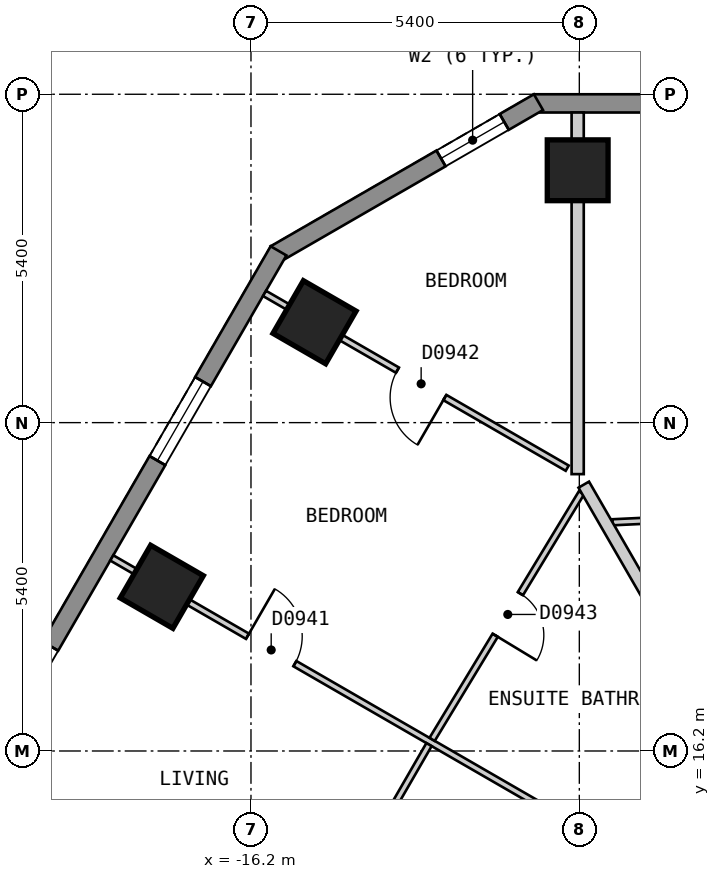
"""IFC4 building model, lengths in metres.
Left out: names, types, materials, properties, quantities, classifications, styles, units other than length and angle.
Written with IfcOpenShell. Run it as: python <this file> out.ifc"""

import sys

from ifc_helpers import new_model, si_unit, direction, frame, frame_2d, origin, origin_2d, place, context, subcontext, project, spatial, polyline, rectangle, outline, extrude, element, fill, save


model = new_model("IFC4")
c1 = context("Model", 3, precision=1e-05, world=origin(), true_north=direction((0.0, 1.0)))
c2 = subcontext(c1, "Body", "Model", "MODEL_VIEW")
j1 = project(units=[si_unit("LENGTHUNIT", "METRE"), si_unit("PLANEANGLEUNIT", "RADIAN")], contexts=[c1])
p1 = place(None, origin())
s1 = spatial("IfcSite", under=j1, at=p1, CompositionType="ELEMENT")
p2 = place(p1, origin())
s2 = spatial("IfcBuilding", under=s1, at=p2, CompositionType="ELEMENT")
p3 = place(p2, frame((0.0, 0.0, 102.0)))
s3 = spatial("IfcBuildingStorey", under=s2, at=p3, CompositionType="ELEMENT", Elevation=102.0)
for number, where, z_axis, x_axis in (
    (1, (-10.827, 25.75, 0.0), (0.0, 0.0, 1.0), (-1.0, 0.0, 0.0)),
    (2, (-15.155, 23.251, 0.0), (0.0, 0.0, 1.0), (-0.5, -0.866, 0.0)),
    (3, (-17.667, 18.9, 0.0), (0.0, 0.0, 1.0), (-0.5, -0.866, 0.0)),
):
    element("IfcColumn", number, at=place(p3, frame(where, z_axis=z_axis, x_axis=x_axis)), inside=s3, PredefinedType="COLUMN", context=c2, shape_type="SweptSolid", body=[
        extrude(rectangle(XDim=1.0, YDim=1.0, at=origin_2d()), origin(), (0.0, 0.0, 1.0), 3.0),
    ])
p4 = place(p3, frame((11.547, 26.85, 0.0), z_axis=(0.0, 0.0, 1.0), x_axis=(-1.0, 0.0, 0.0)))
e4 = element("IfcWall", 4, at=p4, inside=s3, PredefinedType="SOLIDWALL", context=c2, shape_type="SweptSolid", body=[
    extrude(outline(polyline([(0.0, -0.15), (23.094, -0.15), (23.014, 0.15), (0.08, 0.15), (0.0, -0.15)])), origin(), (0.0, 0.0, 1.0), 2.7),
])
p5 = place(p4, frame((2.678, 0.0, 0.15)))
e5 = element("IfcOpeningElement", 5, at=p5, cuts=e4, PredefinedType="OPENING", context=c2, shape_type="SweptSolid", body=[
    extrude(rectangle(XDim=1.5, YDim=2.1, at=frame_2d((0.75, 1.05))), frame((0.0, 0.16, 0.0), z_axis=(0.0, -1.0, 0.0), x_axis=(1.0, 0.0, 0.0)), (0.0, 0.0, 1.0), 0.32),
])
p6 = place(p4, frame((8.092, 0.0, 0.15)))
e6 = element("IfcOpeningElement", 6, at=p6, cuts=e4, PredefinedType="OPENING", context=c2, shape_type="SweptSolid", body=[
    extrude(rectangle(XDim=1.5, YDim=2.1, at=frame_2d((0.75, 1.05))), frame((0.0, 0.16, 0.0), z_axis=(0.0, -1.0, 0.0), x_axis=(1.0, 0.0, 0.0)), (0.0, 0.0, 1.0), 0.32),
])
p7 = place(p4, frame((13.504, 0.0, 0.15)))
e7 = element("IfcOpeningElement", 7, at=p7, cuts=e4, PredefinedType="OPENING", context=c2, shape_type="SweptSolid", body=[
    extrude(rectangle(XDim=1.5, YDim=2.1, at=frame_2d((0.75, 1.05))), frame((0.0, 0.16, 0.0), z_axis=(0.0, -1.0, 0.0), x_axis=(1.0, 0.0, 0.0)), (0.0, 0.0, 1.0), 0.32),
])
p8 = place(p4, frame((18.917, 0.0, 0.15)))
e8 = element("IfcOpeningElement", 8, at=p8, cuts=e4, PredefinedType="OPENING", context=c2, shape_type="SweptSolid", body=[
    extrude(rectangle(XDim=1.5, YDim=2.1, at=frame_2d((0.75, 1.05))), frame((0.0, 0.16, 0.0), z_axis=(0.0, -1.0, 0.0), x_axis=(1.0, 0.0, 0.0)), (0.0, 0.0, 1.0), 0.32),
])
p9 = place(p3, frame((-11.472, 26.87, 0.0), z_axis=(0.0, 0.0, 1.0), x_axis=(-0.866022959057, -0.500004234368, 0.0)))
e9 = element("IfcWall", 9, at=p9, inside=s3, PredefinedType="SOLIDWALL", context=c2, shape_type="SweptSolid", body=[
    extrude(outline(polyline([(0.0, -0.15), (5.0, -0.15), (4.92, 0.15), (0.08, 0.15), (0.0, -0.15)])), origin(), (0.0, 0.0, 1.0), 2.7),
])
p10 = place(p9, frame((0.65, 0.0, 0.15)))
e10 = element("IfcOpeningElement", 10, at=p10, cuts=e9, PredefinedType="OPENING", context=c2, shape_type="SweptSolid", body=[
    extrude(rectangle(XDim=1.2, YDim=2.1, at=frame_2d((0.6, 1.05))), frame((0.0, 0.16, 0.0), z_axis=(0.0, -1.0, 0.0), x_axis=(1.0, 0.0, 0.0)), (0.0, 0.0, 1.0), 0.32),
])
p11 = place(p3, frame((-15.747, 24.425, 0.0), z_axis=(0.0, 0.0, 1.0), x_axis=(-0.500027479704, -0.866009537788, 0.0)))
e11 = element("IfcWall", 11, at=p11, inside=s3, PredefinedType="SOLIDWALL", context=c2, shape_type="SweptSolid", body=[
    extrude(outline(polyline([(0.0, -0.15), (26.559, -0.15), (26.478, 0.15), (0.08, 0.15), (0.0, -0.15)])), origin(), (0.0, 0.0, 1.0), 2.7),
])
p12 = place(p11, frame((2.483, 0.0, 0.15)))
e12 = element("IfcOpeningElement", 12, at=p12, cuts=e11, PredefinedType="OPENING", context=c2, shape_type="SweptSolid", body=[
    extrude(rectangle(XDim=1.5, YDim=2.1, at=frame_2d((0.75, 1.05))), frame((0.0, 0.16, 0.0), z_axis=(0.0, -1.0, 0.0), x_axis=(1.0, 0.0, 0.0)), (0.0, 0.0, 1.0), 0.32),
])
p13 = place(p11, frame((7.506, 0.0, 0.15)))
e13 = element("IfcOpeningElement", 13, at=p13, cuts=e11, PredefinedType="OPENING", context=c2, shape_type="SweptSolid", body=[
    extrude(rectangle(XDim=1.5, YDim=2.1, at=frame_2d((0.75, 1.05))), frame((0.0, 0.16, 0.0), z_axis=(0.0, -1.0, 0.0), x_axis=(1.0, 0.0, 0.0)), (0.0, 0.0, 1.0), 0.32),
])
p14 = place(p11, frame((12.529, 0.0, 0.15)))
e14 = element("IfcOpeningElement", 14, at=p14, cuts=e11, PredefinedType="OPENING", context=c2, shape_type="SweptSolid", body=[
    extrude(rectangle(XDim=1.5, YDim=2.1, at=frame_2d((0.75, 1.05))), frame((0.0, 0.16, 0.0), z_axis=(0.0, -1.0, 0.0), x_axis=(1.0, 0.0, 0.0)), (0.0, 0.0, 1.0), 0.32),
])
p15 = place(p11, frame((17.552, 0.0, 0.15)))
e15 = element("IfcOpeningElement", 15, at=p15, cuts=e11, PredefinedType="OPENING", context=c2, shape_type="SweptSolid", body=[
    extrude(rectangle(XDim=1.5, YDim=2.1, at=frame_2d((0.75, 1.05))), frame((0.0, 0.16, 0.0), z_axis=(0.0, -1.0, 0.0), x_axis=(1.0, 0.0, 0.0)), (0.0, 0.0, 1.0), 0.32),
])
p16 = place(p11, frame((22.575, 0.0, 0.15)))
e16 = element("IfcOpeningElement", 16, at=p16, cuts=e11, PredefinedType="OPENING", context=c2, shape_type="SweptSolid", body=[
    extrude(rectangle(XDim=1.5, YDim=2.1, at=frame_2d((0.75, 1.05))), frame((0.0, 0.16, 0.0), z_axis=(0.0, -1.0, 0.0), x_axis=(1.0, 0.0, 0.0)), (0.0, 0.0, 1.0), 0.32),
])
p17 = place(p3, frame((-18.562, -0.951, 0.0), z_axis=(0.0, 0.0, 1.0), x_axis=(0.499987097491, 0.866032852923, 0.0)))
e17 = element("IfcWall", 17, at=p17, inside=s3, PredefinedType="PARTITIONING", context=c2, shape_type="SweptSolid", body=[
    extrude(rectangle(XDim=20.15, YDim=0.2, at=frame_2d((10.075, 0.0))), origin(), (0.0, 0.0, 1.0), 2.7),
])
p18 = place(p17, frame((14.627, 0.0, 0.0)))
e18 = element("IfcOpeningElement", 18, at=p18, cuts=e17, PredefinedType="OPENING", context=c2, shape_type="SweptSolid", body=[
    extrude(rectangle(XDim=1.0, YDim=2.1, at=frame_2d((0.5, 1.05))), frame((0.0, 0.11, 0.0), z_axis=(0.0, -1.0, 0.0), x_axis=(1.0, 0.0, 0.0)), (0.0, 0.0, 1.0), 0.22),
])
p19 = place(p17, frame((9.604, 0.0, 0.0)))
e19 = element("IfcOpeningElement", 19, at=p19, cuts=e17, PredefinedType="OPENING", context=c2, shape_type="SweptSolid", body=[
    extrude(rectangle(XDim=1.0, YDim=2.1, at=frame_2d((0.5, 1.05))), frame((0.0, 0.11, 0.0), z_axis=(0.0, -1.0, 0.0), x_axis=(1.0, 0.0, 0.0)), (0.0, 0.0, 1.0), 0.22),
])
p20 = place(p3, frame((-18.489, 19.375, 0.0), z_axis=(0.0, 0.0, 1.0), x_axis=(0.866016855193, -0.500014806302, 0.0)))
e20 = element("IfcWall", 20, at=p20, inside=s3, PredefinedType="PARTITIONING", context=c2, shape_type="SweptSolid", body=[
    extrude(rectangle(XDim=10.0, YDim=0.1, at=frame_2d((5.0, 0.0))), origin(), (0.0, 0.0, 1.0), 2.7),
])
p21 = place(p20, frame((2.577, 0.0, 0.0)))
e21 = element("IfcOpeningElement", 21, at=p21, cuts=e20, PredefinedType="OPENING", context=c2, shape_type="SweptSolid", body=[
    extrude(rectangle(XDim=0.9, YDim=2.1, at=frame_2d((0.45, 1.05))), frame((0.0, 0.06, 0.0), z_axis=(0.0, -1.0, 0.0), x_axis=(1.0, 0.0, 0.0)), (0.0, 0.0, 1.0), 0.12),
])
p22 = place(p3, frame((-15.977, 23.725, 0.0), z_axis=(0.0, 0.0, 1.0), x_axis=(0.866028566888, -0.499994521305, 0.0)))
e22 = element("IfcWall", 22, at=p22, inside=s3, PredefinedType="PARTITIONING", context=c2, shape_type="SweptSolid", body=[
    extrude(rectangle(XDim=5.748, YDim=0.1, at=frame_2d((2.874, 0.0))), origin(), (0.0, 0.0, 1.0), 2.7),
])
p23 = place(p22, frame((2.524, 0.0, 0.0)))
e23 = element("IfcOpeningElement", 23, at=p23, cuts=e22, PredefinedType="OPENING", context=c2, shape_type="SweptSolid", body=[
    extrude(rectangle(XDim=0.9, YDim=2.1, at=frame_2d((0.45, 1.05))), frame((0.0, 0.06, 0.0), z_axis=(0.0, -1.0, 0.0), x_axis=(1.0, 0.0, 0.0)), (0.0, 0.0, 1.0), 0.12),
])
p24 = place(p3, frame((-13.221, 16.391, 0.0), z_axis=(0.0, 0.0, 1.0), x_axis=(0.518164725284, 0.855280841286, 0.0)))
e24 = element("IfcWall", 24, at=p24, inside=s3, PredefinedType="PARTITIONING", context=c2, shape_type="SweptSolid", body=[
    extrude(rectangle(XDim=4.74, YDim=0.1, at=frame_2d((2.37, 0.0))), origin(), (0.0, 0.0, 1.0), 2.7),
])
p25 = place(p24, frame((2.002, 0.0, 0.0)))
e25 = element("IfcOpeningElement", 25, at=p25, cuts=e24, PredefinedType="OPENING", context=c2, shape_type="SweptSolid", body=[
    extrude(rectangle(XDim=0.8, YDim=2.1, at=frame_2d((0.4, 1.05))), frame((0.0, 0.06, 0.0), z_axis=(0.0, -1.0, 0.0), x_axis=(1.0, 0.0, 0.0)), (0.0, 0.0, 1.0), 0.12),
])
p26 = place(p3, frame((-15.708, 12.085, 0.0), z_axis=(0.0, 0.0, 1.0), x_axis=(0.499943653708, 0.866057932887, 0.0)))
e26 = element("IfcWall", 26, at=p26, inside=s3, PredefinedType="PARTITIONING", context=c2, shape_type="SweptSolid", body=[
    extrude(rectangle(XDim=4.873, YDim=0.1, at=frame_2d((2.436, 0.0))), origin(), (0.0, 0.0, 1.0), 2.7),
])
p27 = place(p26, frame((1.962, 0.0, 0.0)))
e27 = element("IfcOpeningElement", 27, at=p27, cuts=e26, PredefinedType="OPENING", context=c2, shape_type="SweptSolid", body=[
    extrude(rectangle(XDim=0.9, YDim=2.1, at=frame_2d((0.45, 1.05))), frame((0.0, 0.06, 0.0), z_axis=(0.0, -1.0, 0.0), x_axis=(1.0, 0.0, 0.0)), (0.0, 0.0, 1.0), 0.12),
])
p28 = place(p3, frame((-10.254, 19.961, 0.0), z_axis=(0.0, 0.0, 1.0), x_axis=(0.998851840647, 0.047906162812, 0.0)))
e28 = element("IfcWall", 28, at=p28, inside=s3, PredefinedType="PARTITIONING", context=c2, shape_type="SweptSolid", body=[
    extrude(rectangle(XDim=1.463, YDim=0.1, at=frame_2d((0.731, 0.0))), origin(), (0.0, 0.0, 1.0), 2.7),
])
p29 = place(p3, frame((-10.727, 20.58, 0.0), z_axis=(0.0, 0.0, 1.0), x_axis=(0.500041272028, -0.866001574057, 0.0)))
e29 = element("IfcWall", 29, at=p29, inside=s3, PredefinedType="PARTITIONING", context=c2, shape_type="SweptSolid", body=[
    extrude(rectangle(XDim=4.596, YDim=0.2, at=frame_2d((2.298, 0.0))), origin(), (0.0, 0.0, 1.0), 2.7),
])
p30 = place(p3, frame((-10.827, 20.753, 0.0), z_axis=(0.0, 0.0, 1.0), x_axis=(0.0, 1.0, 0.0)))
e30 = element("IfcWall", 30, at=p30, inside=s3, PredefinedType="PARTITIONING", context=c2, shape_type="SweptSolid", body=[
    extrude(rectangle(XDim=5.947, YDim=0.2, at=frame_2d((2.974, 0.0))), origin(), (0.0, 0.0, 1.0), 2.7),
])
p31 = place(p10, origin())
e31 = element("IfcWindow", 31, at=p31, inside=s3, PartitioningType="SINGLE_PANEL", PredefinedType="WINDOW", context=c2, shape_type="SweptSolid", body=[
    extrude(rectangle(XDim=1.2, YDim=2.1, at=frame_2d((0.6, 1.05))), frame((0.0, 0.03, 0.0), z_axis=(0.0, -1.0, 0.0), x_axis=(1.0, 0.0, 0.0)), (0.0, 0.0, 1.0), 0.06),
])
fill(e10, e31)
p32 = place(p12, origin())
e32 = element("IfcWindow", 32, at=p32, inside=s3, PartitioningType="SINGLE_PANEL", PredefinedType="WINDOW", context=c2, shape_type="SweptSolid", body=[
    extrude(rectangle(XDim=1.5, YDim=2.1, at=frame_2d((0.75, 1.05))), frame((0.0, 0.03, 0.0), z_axis=(0.0, -1.0, 0.0), x_axis=(1.0, 0.0, 0.0)), (0.0, 0.0, 1.0), 0.06),
])
fill(e12, e32)
p33 = place(p21, origin())
e33 = element("IfcDoor", 33, at=p33, inside=s3, OperationType="SINGLE_SWING_LEFT", PredefinedType="DOOR", context=c2, shape_type="SweptSolid", body=[
    extrude(rectangle(XDim=0.9, YDim=2.1, at=frame_2d((0.45, 1.05))), frame((0.0, 0.025, 0.0), z_axis=(0.0, -1.0, 0.0), x_axis=(1.0, 0.0, 0.0)), (0.0, 0.0, 1.0), 0.05),
])
fill(e21, e33)
p34 = place(p23, origin())
e34 = element("IfcDoor", 34, at=p34, inside=s3, OperationType="SINGLE_SWING_RIGHT", PredefinedType="DOOR", context=c2, shape_type="SweptSolid", body=[
    extrude(rectangle(XDim=0.9, YDim=2.1, at=frame_2d((0.45, 1.05))), frame((0.0, 0.025, 0.0), z_axis=(0.0, -1.0, 0.0), x_axis=(1.0, 0.0, 0.0)), (0.0, 0.0, 1.0), 0.05),
])
fill(e23, e34)
p35 = place(p25, origin())
e35 = element("IfcDoor", 35, at=p35, inside=s3, OperationType="SINGLE_SWING_LEFT", PredefinedType="DOOR", context=c2, shape_type="SweptSolid", body=[
    extrude(rectangle(XDim=0.8, YDim=2.1, at=frame_2d((0.4, 1.05))), frame((0.0, 0.025, 0.0), z_axis=(0.0, -1.0, 0.0), x_axis=(1.0, 0.0, 0.0)), (0.0, 0.0, 1.0), 0.05),
])
fill(e25, e35)
save(model, sys.argv[1])
